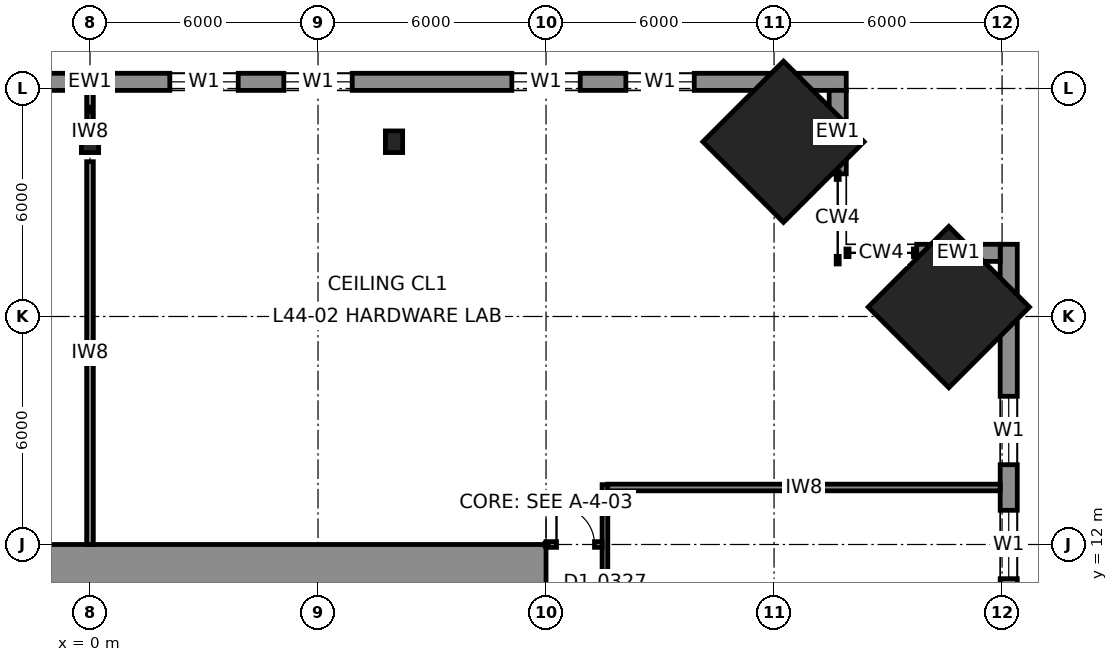
"""IFC4 building model, lengths in metres.
Left out: names, types, materials, properties, quantities, classifications, styles, units other than length and angle.
Written with IfcOpenShell. Run it as: python <this file> out.ifc"""

import sys

from ifc_helpers import new_model, si_unit, direction, frame, frame_2d, origin, origin_2d, place, context, subcontext, project, spatial, rectangle, i_section, extrude, element, fill, save


model = new_model("IFC4")
c1 = context("Model", 3, precision=1e-05, world=origin(), true_north=direction((0.0, 1.0)))
c2 = subcontext(c1, "Body", "Model", "MODEL_VIEW")
j1 = project(units=[si_unit("LENGTHUNIT", "METRE"), si_unit("PLANEANGLEUNIT", "RADIAN")], contexts=[c1])
p1 = place(None, origin())
s1 = spatial("IfcSite", under=j1, at=p1, CompositionType="ELEMENT")
p2 = place(p1, origin())
s2 = spatial("IfcBuilding", under=s1, at=p2, CompositionType="ELEMENT")
p3 = place(p2, frame((0.0, 0.0, 205.8)))
s3 = spatial("IfcBuildingStorey", under=s2, at=p3, CompositionType="ELEMENT", Elevation=205.8)
for number, where, z_axis, x_axis in (
    (1, (18.248, 22.598, 0.0), (-0.04, -0.04, 0.998), (0.708, -0.707, 0.0)),
    (2, (22.598, 18.248, 0.0), (-0.04, -0.04, 0.998), (0.707, -0.708, 0.0)),
):
    element("IfcColumn", number, at=place(p3, frame(where, z_axis=z_axis, x_axis=x_axis)), inside=s3, PredefinedType="COLUMN", context=c2, shape_type="SweptSolid", body=[
        extrude(rectangle(XDim=3.0, YDim=3.0, at=origin_2d()), origin(), (0.0, 0.0, 1.0), 4.007),
    ])
for number, where, z_axis, x_axis in (
    (3, (0.0, 22.598, 0.0), (0.0, -0.04, 0.999), (1.0, 0.0, 0.0)),
    (4, (8.0, 22.598, 0.0), (0.0, -0.04, 0.999), (1.0, 0.0, 0.0)),
):
    element("IfcColumn", number, at=place(p3, frame(where, z_axis=z_axis, x_axis=x_axis)), inside=s3, PredefinedType="COLUMN", context=c2, shape_type="SweptSolid", body=[
        extrude(i_section(OverallWidth=0.454, OverallDepth=0.569, WebThickness=0.078, FlangeThickness=0.125, at=origin_2d()), origin(), (0.0, 0.0, 1.0), 4.003),
    ])
p4 = place(p3, frame((-12.0, 11.25, 0.0), z_axis=(0.0, 0.0, 1.0), x_axis=(1.0, 0.0, 0.0)))
e5 = element("IfcWall", 5, at=p4, inside=s3, PredefinedType="SHEAR", context=c2, shape_type="SweptSolid", body=[
    extrude(rectangle(XDim=24.0, YDim=1.5, at=frame_2d((12.0, 0.0))), origin(), (0.0, 0.0, 1.0), 4.0),
])
p5 = place(p3, frame((19.9, 24.175, 0.0), z_axis=(0.0, 0.0, 1.0), x_axis=(-1.0, 0.0, 0.0)))
e6 = element("IfcWall", 6, at=p5, inside=s3, PredefinedType="SOLIDWALL", context=c2, shape_type="SweptSolid", body=[
    extrude(rectangle(XDim=39.8, YDim=0.45, at=frame_2d((19.9, 0.0))), origin(), (0.0, 0.0, 1.0), 3.83),
])
p6 = place(p5, frame((4.0, 0.0, 0.7)))
e7 = element("IfcOpeningElement", 7, at=p6, cuts=e6, PredefinedType="OPENING", context=c2, shape_type="SweptSolid", body=[
    extrude(rectangle(XDim=1.8, YDim=2.6, at=frame_2d((0.9, 1.3))), frame((0.0, 0.235, 0.0), z_axis=(0.0, -1.0, 0.0), x_axis=(1.0, 0.0, 0.0)), (0.0, 0.0, 1.0), 0.47),
])
p7 = place(p5, frame((7.0, 0.0, 0.7)))
e8 = element("IfcOpeningElement", 8, at=p7, cuts=e6, PredefinedType="OPENING", context=c2, shape_type="SweptSolid", body=[
    extrude(rectangle(XDim=1.8, YDim=2.6, at=frame_2d((0.9, 1.3))), frame((0.0, 0.235, 0.0), z_axis=(0.0, -1.0, 0.0), x_axis=(1.0, 0.0, 0.0)), (0.0, 0.0, 1.0), 0.47),
])
p8 = place(p5, frame((13.0, 0.0, 0.7)))
e9 = element("IfcOpeningElement", 9, at=p8, cuts=e6, PredefinedType="OPENING", context=c2, shape_type="SweptSolid", body=[
    extrude(rectangle(XDim=1.8, YDim=2.6, at=frame_2d((0.9, 1.3))), frame((0.0, 0.235, 0.0), z_axis=(0.0, -1.0, 0.0), x_axis=(1.0, 0.0, 0.0)), (0.0, 0.0, 1.0), 0.47),
])
p9 = place(p5, frame((16.0, 0.0, 0.7)))
e10 = element("IfcOpeningElement", 10, at=p9, cuts=e6, PredefinedType="OPENING", context=c2, shape_type="SweptSolid", body=[
    extrude(rectangle(XDim=1.8, YDim=2.6, at=frame_2d((0.9, 1.3))), frame((0.0, 0.235, 0.0), z_axis=(0.0, -1.0, 0.0), x_axis=(1.0, 0.0, 0.0)), (0.0, 0.0, 1.0), 0.47),
])
p10 = place(p5, frame((22.0, 0.0, 0.7)))
e11 = element("IfcOpeningElement", 11, at=p10, cuts=e6, PredefinedType="OPENING", context=c2, shape_type="SweptSolid", body=[
    extrude(rectangle(XDim=1.8, YDim=2.6, at=frame_2d((0.9, 1.3))), frame((0.0, 0.235, 0.0), z_axis=(0.0, -1.0, 0.0), x_axis=(1.0, 0.0, 0.0)), (0.0, 0.0, 1.0), 0.47),
])
p11 = place(p5, frame((25.0, 0.0, 0.7)))
e12 = element("IfcOpeningElement", 12, at=p11, cuts=e6, PredefinedType="OPENING", context=c2, shape_type="SweptSolid", body=[
    extrude(rectangle(XDim=1.8, YDim=2.6, at=frame_2d((0.9, 1.3))), frame((0.0, 0.235, 0.0), z_axis=(0.0, -1.0, 0.0), x_axis=(1.0, 0.0, 0.0)), (0.0, 0.0, 1.0), 0.47),
])
p12 = place(p5, frame((31.0, 0.0, 0.7)))
e13 = element("IfcOpeningElement", 13, at=p12, cuts=e6, PredefinedType="OPENING", context=c2, shape_type="SweptSolid", body=[
    extrude(rectangle(XDim=1.8, YDim=2.6, at=frame_2d((0.9, 1.3))), frame((0.0, 0.235, 0.0), z_axis=(0.0, -1.0, 0.0), x_axis=(1.0, 0.0, 0.0)), (0.0, 0.0, 1.0), 0.47),
])
p13 = place(p5, frame((34.0, 0.0, 0.7)))
e14 = element("IfcOpeningElement", 14, at=p13, cuts=e6, PredefinedType="OPENING", context=c2, shape_type="SweptSolid", body=[
    extrude(rectangle(XDim=1.8, YDim=2.6, at=frame_2d((0.9, 1.3))), frame((0.0, 0.235, 0.0), z_axis=(0.0, -1.0, 0.0), x_axis=(1.0, 0.0, 0.0)), (0.0, 0.0, 1.0), 0.47),
])
p14 = place(p3, frame((24.175, -19.9, 0.0), z_axis=(0.0, 0.0, 1.0), x_axis=(0.0, 1.0, 0.0)))
e15 = element("IfcWall", 15, at=p14, inside=s3, PredefinedType="SOLIDWALL", context=c2, shape_type="SweptSolid", body=[
    extrude(rectangle(XDim=39.8, YDim=0.45, at=frame_2d((19.9, 0.0))), origin(), (0.0, 0.0, 1.0), 3.83),
])
p15 = place(p14, frame((4.0, 0.0, 0.7)))
e16 = element("IfcOpeningElement", 16, at=p15, cuts=e15, PredefinedType="OPENING", context=c2, shape_type="SweptSolid", body=[
    extrude(rectangle(XDim=1.8, YDim=2.6, at=frame_2d((0.9, 1.3))), frame((0.0, 0.235, 0.0), z_axis=(0.0, -1.0, 0.0), x_axis=(1.0, 0.0, 0.0)), (0.0, 0.0, 1.0), 0.47),
])
p16 = place(p14, frame((7.0, 0.0, 0.7)))
e17 = element("IfcOpeningElement", 17, at=p16, cuts=e15, PredefinedType="OPENING", context=c2, shape_type="SweptSolid", body=[
    extrude(rectangle(XDim=1.8, YDim=2.6, at=frame_2d((0.9, 1.3))), frame((0.0, 0.235, 0.0), z_axis=(0.0, -1.0, 0.0), x_axis=(1.0, 0.0, 0.0)), (0.0, 0.0, 1.0), 0.47),
])
p17 = place(p14, frame((13.0, 0.0, 0.7)))
e18 = element("IfcOpeningElement", 18, at=p17, cuts=e15, PredefinedType="OPENING", context=c2, shape_type="SweptSolid", body=[
    extrude(rectangle(XDim=1.8, YDim=2.6, at=frame_2d((0.9, 1.3))), frame((0.0, 0.235, 0.0), z_axis=(0.0, -1.0, 0.0), x_axis=(1.0, 0.0, 0.0)), (0.0, 0.0, 1.0), 0.47),
])
p18 = place(p14, frame((16.0, 0.0, 0.7)))
e19 = element("IfcOpeningElement", 19, at=p18, cuts=e15, PredefinedType="OPENING", context=c2, shape_type="SweptSolid", body=[
    extrude(rectangle(XDim=1.8, YDim=2.6, at=frame_2d((0.9, 1.3))), frame((0.0, 0.235, 0.0), z_axis=(0.0, -1.0, 0.0), x_axis=(1.0, 0.0, 0.0)), (0.0, 0.0, 1.0), 0.47),
])
p19 = place(p14, frame((22.0, 0.0, 0.7)))
e20 = element("IfcOpeningElement", 20, at=p19, cuts=e15, PredefinedType="OPENING", context=c2, shape_type="SweptSolid", body=[
    extrude(rectangle(XDim=1.8, YDim=2.6, at=frame_2d((0.9, 1.3))), frame((0.0, 0.235, 0.0), z_axis=(0.0, -1.0, 0.0), x_axis=(1.0, 0.0, 0.0)), (0.0, 0.0, 1.0), 0.47),
])
p20 = place(p14, frame((25.0, 0.0, 0.7)))
e21 = element("IfcOpeningElement", 21, at=p20, cuts=e15, PredefinedType="OPENING", context=c2, shape_type="SweptSolid", body=[
    extrude(rectangle(XDim=1.8, YDim=2.6, at=frame_2d((0.9, 1.3))), frame((0.0, 0.235, 0.0), z_axis=(0.0, -1.0, 0.0), x_axis=(1.0, 0.0, 0.0)), (0.0, 0.0, 1.0), 0.47),
])
p21 = place(p14, frame((31.0, 0.0, 0.7)))
e22 = element("IfcOpeningElement", 22, at=p21, cuts=e15, PredefinedType="OPENING", context=c2, shape_type="SweptSolid", body=[
    extrude(rectangle(XDim=1.8, YDim=2.6, at=frame_2d((0.9, 1.3))), frame((0.0, 0.235, 0.0), z_axis=(0.0, -1.0, 0.0), x_axis=(1.0, 0.0, 0.0)), (0.0, 0.0, 1.0), 0.47),
])
p22 = place(p14, frame((34.0, 0.0, 0.7)))
e23 = element("IfcOpeningElement", 23, at=p22, cuts=e15, PredefinedType="OPENING", context=c2, shape_type="SweptSolid", body=[
    extrude(rectangle(XDim=1.8, YDim=2.6, at=frame_2d((0.9, 1.3))), frame((0.0, 0.235, 0.0), z_axis=(0.0, -1.0, 0.0), x_axis=(1.0, 0.0, 0.0)), (0.0, 0.0, 1.0), 0.47),
])
for number, where, z_axis, x_axis in (
    (24, (19.675, 21.754, 0.0), (0.0, 0.0, 1.0), (0.0, 1.0, 0.0)),
    (25, (21.754, 19.675, 0.0), (0.0, 0.0, 1.0), (1.0, 0.0, 0.0)),
):
    element("IfcWall", number, at=place(p3, frame(where, z_axis=z_axis, x_axis=x_axis)), inside=s3, PredefinedType="SOLIDWALL", context=c2, shape_type="SweptSolid", body=[
        extrude(rectangle(XDim=2.196, YDim=0.45, at=frame_2d((1.098, 0.0))), origin(), (0.0, 0.0, 1.0), 3.83),
    ])
p23 = place(p3, frame((13.55, -13.575, 0.0), z_axis=(0.0, 0.0, 1.0), x_axis=(0.0, 1.0, 0.0)))
e26 = element("IfcWall", 26, at=p23, inside=s3, PredefinedType="PARTITIONING", context=c2, shape_type="SweptSolid", body=[
    extrude(rectangle(XDim=27.15, YDim=0.15, at=frame_2d((13.575, 0.0))), origin(), (0.0, 0.0, 1.0), 3.83),
])
p24 = place(p23, frame((3.175, 0.0, 0.0)))
e27 = element("IfcOpeningElement", 27, at=p24, cuts=e26, PredefinedType="OPENING", context=c2, shape_type="SweptSolid", body=[
    extrude(rectangle(XDim=1.0, YDim=2.3, at=frame_2d((0.5, 1.15))), frame((0.0, 0.085, 0.0), z_axis=(0.0, -1.0, 0.0), x_axis=(1.0, 0.0, 0.0)), (0.0, 0.0, 1.0), 0.17),
])
p25 = place(p23, frame((13.325, 0.0, 0.0)))
e28 = element("IfcOpeningElement", 28, at=p25, cuts=e26, PredefinedType="OPENING", context=c2, shape_type="SweptSolid", body=[
    extrude(rectangle(XDim=1.0, YDim=2.3, at=frame_2d((0.5, 1.15))), frame((0.0, 0.085, 0.0), z_axis=(0.0, -1.0, 0.0), x_axis=(1.0, 0.0, 0.0)), (0.0, 0.0, 1.0), 0.17),
])
p26 = place(p23, frame((22.975, 0.0, 0.0)))
e29 = element("IfcOpeningElement", 29, at=p26, cuts=e26, PredefinedType="OPENING", context=c2, shape_type="SweptSolid", body=[
    extrude(rectangle(XDim=1.0, YDim=2.3, at=frame_2d((0.5, 1.15))), frame((0.0, 0.085, 0.0), z_axis=(0.0, -1.0, 0.0), x_axis=(1.0, 0.0, 0.0)), (0.0, 0.0, 1.0), 0.17),
])
p27 = place(p23, frame((9.325, 0.0, 0.0)))
e30 = element("IfcOpeningElement", 30, at=p27, cuts=e26, PredefinedType="OPENING", context=c2, shape_type="SweptSolid", body=[
    extrude(rectangle(XDim=1.0, YDim=2.3, at=frame_2d((0.5, 1.15))), frame((0.0, 0.085, 0.0), z_axis=(0.0, -1.0, 0.0), x_axis=(1.0, 0.0, 0.0)), (0.0, 0.0, 1.0), 0.17),
])
p28 = place(p23, frame((16.825, 0.0, 0.0)))
e31 = element("IfcOpeningElement", 31, at=p28, cuts=e26, PredefinedType="OPENING", context=c2, shape_type="SweptSolid", body=[
    extrude(rectangle(XDim=1.0, YDim=2.3, at=frame_2d((0.5, 1.15))), frame((0.0, 0.085, 0.0), z_axis=(0.0, -1.0, 0.0), x_axis=(1.0, 0.0, 0.0)), (0.0, 0.0, 1.0), 0.17),
])
p29 = place(p3, frame((12.0, 12.0, 0.0), z_axis=(0.0, 0.0, 1.0), x_axis=(1.0, 0.0, 0.0)))
e32 = element("IfcWall", 32, at=p29, inside=s3, PredefinedType="PARTITIONING", context=c2, shape_type="SweptSolid", body=[
    extrude(rectangle(XDim=1.475, YDim=0.15, at=frame_2d((0.738, 0.0))), origin(), (0.0, 0.0, 1.0), 3.83),
])
p30 = place(p29, frame((0.275, 0.0, 0.0)))
e33 = element("IfcOpeningElement", 33, at=p30, cuts=e32, PredefinedType="OPENING", context=c2, shape_type="SweptSolid", body=[
    extrude(rectangle(XDim=1.0, YDim=2.3, at=frame_2d((0.5, 1.15))), frame((0.0, 0.085, 0.0), z_axis=(0.0, -1.0, 0.0), x_axis=(1.0, 0.0, 0.0)), (0.0, 0.0, 1.0), 0.17),
])
p31 = place(p3, frame((13.625, 13.5, 0.0), z_axis=(0.0, 0.0, 1.0), x_axis=(1.0, 0.0, 0.0)))
e34 = element("IfcWall", 34, at=p31, inside=s3, PredefinedType="PARTITIONING", context=c2, shape_type="SweptSolid", body=[
    extrude(rectangle(XDim=10.325, YDim=0.175, at=frame_2d((5.163, 0.0))), origin(), (0.0, 0.0, 1.0), 3.83),
])
p32 = place(p3, frame((0.0, 12.0, 0.0), z_axis=(0.0, 0.0, 1.0), x_axis=(0.0, 1.0, 0.0)))
e35 = element("IfcWall", 35, at=p32, inside=s3, PredefinedType="PARTITIONING", context=c2, shape_type="SweptSolid", body=[
    extrude(rectangle(XDim=10.073, YDim=0.175, at=frame_2d((5.037, 0.0))), origin(), (0.0, 0.0, 1.0), 3.04),
])
p33 = place(p3, frame((0.0, 22.962, 0.0), z_axis=(0.0, 0.0, 1.0), x_axis=(0.0, 1.0, 0.0)))
e36 = element("IfcWall", 36, at=p33, inside=s3, PredefinedType="PARTITIONING", context=c2, shape_type="SweptSolid", body=[
    extrude(rectangle(XDim=0.988, YDim=0.175, at=frame_2d((0.494, 0.0))), origin(), (0.0, 0.0, 1.0), 3.83),
])
p34 = place(p6, origin())
e37 = element("IfcWindow", 37, at=p34, inside=s3, PartitioningType="SINGLE_PANEL", PredefinedType="WINDOW", context=c2, shape_type="SweptSolid", body=[
    extrude(rectangle(XDim=1.8, YDim=2.6, at=frame_2d((0.9, 1.3))), frame((0.0, 0.03, 0.0), z_axis=(0.0, -1.0, 0.0), x_axis=(1.0, 0.0, 0.0)), (0.0, 0.0, 1.0), 0.06),
])
fill(e7, e37)
p35 = place(p7, origin())
e38 = element("IfcWindow", 38, at=p35, inside=s3, PartitioningType="SINGLE_PANEL", PredefinedType="WINDOW", context=c2, shape_type="SweptSolid", body=[
    extrude(rectangle(XDim=1.8, YDim=2.6, at=frame_2d((0.9, 1.3))), frame((0.0, 0.03, 0.0), z_axis=(0.0, -1.0, 0.0), x_axis=(1.0, 0.0, 0.0)), (0.0, 0.0, 1.0), 0.06),
])
fill(e8, e38)
p36 = place(p8, origin())
e39 = element("IfcWindow", 39, at=p36, inside=s3, PartitioningType="SINGLE_PANEL", PredefinedType="WINDOW", context=c2, shape_type="SweptSolid", body=[
    extrude(rectangle(XDim=1.8, YDim=2.6, at=frame_2d((0.9, 1.3))), frame((0.0, 0.03, 0.0), z_axis=(0.0, -1.0, 0.0), x_axis=(1.0, 0.0, 0.0)), (0.0, 0.0, 1.0), 0.06),
])
fill(e9, e39)
p37 = place(p9, origin())
e40 = element("IfcWindow", 40, at=p37, inside=s3, PartitioningType="SINGLE_PANEL", PredefinedType="WINDOW", context=c2, shape_type="SweptSolid", body=[
    extrude(rectangle(XDim=1.8, YDim=2.6, at=frame_2d((0.9, 1.3))), frame((0.0, 0.03, 0.0), z_axis=(0.0, -1.0, 0.0), x_axis=(1.0, 0.0, 0.0)), (0.0, 0.0, 1.0), 0.06),
])
fill(e10, e40)
p38 = place(p21, origin())
e41 = element("IfcWindow", 41, at=p38, inside=s3, PartitioningType="SINGLE_PANEL", PredefinedType="WINDOW", context=c2, shape_type="SweptSolid", body=[
    extrude(rectangle(XDim=1.8, YDim=2.6, at=frame_2d((0.9, 1.3))), frame((0.0, 0.03, 0.0), z_axis=(0.0, -1.0, 0.0), x_axis=(1.0, 0.0, 0.0)), (0.0, 0.0, 1.0), 0.06),
])
fill(e22, e41)
p39 = place(p22, origin())
e42 = element("IfcWindow", 42, at=p39, inside=s3, PartitioningType="SINGLE_PANEL", PredefinedType="WINDOW", context=c2, shape_type="SweptSolid", body=[
    extrude(rectangle(XDim=1.8, YDim=2.6, at=frame_2d((0.9, 1.3))), frame((0.0, 0.03, 0.0), z_axis=(0.0, -1.0, 0.0), x_axis=(1.0, 0.0, 0.0)), (0.0, 0.0, 1.0), 0.06),
])
fill(e23, e42)
p40 = place(p30, origin())
e43 = element("IfcDoor", 43, at=p40, inside=s3, OperationType="SINGLE_SWING_LEFT", PredefinedType="DOOR", context=c2, shape_type="SweptSolid", body=[
    extrude(rectangle(XDim=1.0, YDim=2.3, at=frame_2d((0.5, 1.15))), frame((0.0, 0.025, 0.0), z_axis=(0.0, -1.0, 0.0), x_axis=(1.0, 0.0, 0.0)), (0.0, 0.0, 1.0), 0.05),
])
fill(e33, e43)
save(model, sys.argv[1])
